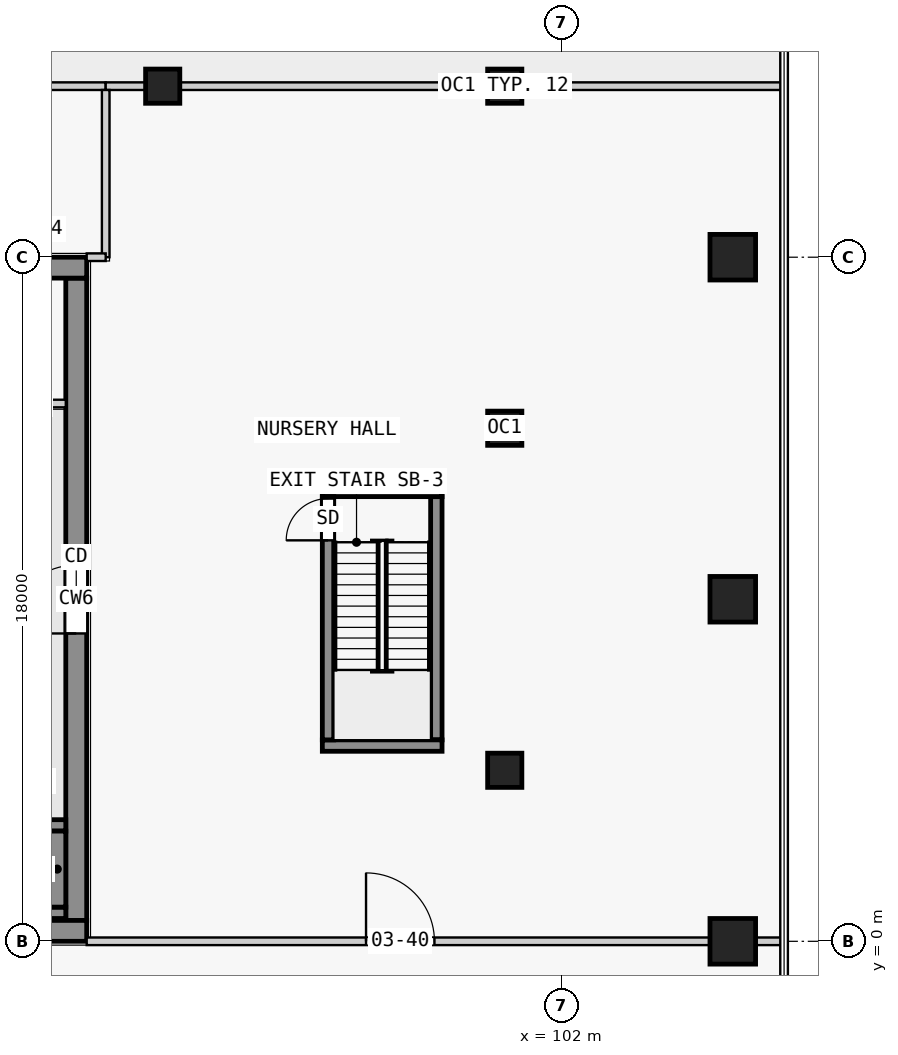
"""IFC4 building model, lengths in metres.
Left out: names, types, materials, properties, quantities, classifications, styles, units other than length and angle.
Written with IfcOpenShell. Run it as: python <this file> out.ifc"""

import sys

from ifc_helpers import new_model, si_unit, direction, frame, frame_2d, origin, origin_2d, place, context, subcontext, project, spatial, rectangle, extrude, element, fill, save


model = new_model("IFC4")
c1 = context("Model", 3, precision=1e-05, world=origin(), true_north=direction((0.0, 1.0)))
c2 = subcontext(c1, "Body", "Model", "MODEL_VIEW")
j1 = project(units=[si_unit("LENGTHUNIT", "METRE"), si_unit("PLANEANGLEUNIT", "RADIAN")], contexts=[c1])
p1 = place(None, origin())
s1 = spatial("IfcSite", under=j1, at=p1, CompositionType="ELEMENT")
p2 = place(p1, origin())
s2 = spatial("IfcBuilding", under=s1, at=p2, CompositionType="ELEMENT")
p3 = place(p2, frame((0.0, 0.0, 17.3)))
s3 = spatial("IfcBuildingStorey", under=s2, at=p3, CompositionType="ELEMENT", Elevation=17.3)
for number, where, z_axis, x_axis in (
    (1, (106.5, 0.0, 0.0), (0.0, 0.0, 1.0), (1.0, 0.0, 0.0)),
    (2, (106.5, 9.0, 0.0), (0.0, 0.0, 1.0), (1.0, 0.0, 0.0)),
    (3, (106.5, 18.0, 0.0), (0.0, 0.0, 1.0), (1.0, 0.0, 0.0)),
):
    element("IfcColumn", number, at=place(p3, frame(where, z_axis=z_axis, x_axis=x_axis)), inside=s3, PredefinedType="COLUMN", context=c2, shape_type="SweptSolid", body=[
        extrude(rectangle(XDim=1.2, YDim=1.2, at=origin_2d()), origin(), (0.0, 0.0, 1.0), 4.5),
    ])
for number, where, z_axis, x_axis in (
    (4, (100.5, 4.5, 0.0), (0.0, 0.0, 1.0), (1.0, 0.0, 0.0)),
    (5, (100.5, 13.5, 0.0), (0.0, 0.0, 1.0), (1.0, 0.0, 0.0)),
    (6, (100.5, 22.5, 0.0), (0.0, 0.0, 1.0), (1.0, 0.0, 0.0)),
    (7, (91.5, 22.5, 0.0), (0.0, 0.0, 1.0), (1.0, 0.0, 0.0)),
):
    element("IfcColumn", number, at=place(p3, frame(where, z_axis=z_axis, x_axis=x_axis)), inside=s3, PredefinedType="COLUMN", context=c2, shape_type="SweptSolid", body=[
        extrude(rectangle(XDim=0.9, YDim=0.9, at=origin_2d()), origin(), (0.0, 0.0, 1.0), 4.5),
    ])
for number, where, z_axis, x_axis in (
    (8, (75.0, 0.275, 0.0), (0.0, 0.0, 1.0), (1.0, 0.0, 0.0)),
    (9, (75.0, 17.725, 0.0), (0.0, 0.0, 1.0), (1.0, 0.0, 0.0)),
):
    element("IfcWall", number, at=place(p3, frame(where, z_axis=z_axis, x_axis=x_axis)), inside=s3, PredefinedType="SHEAR", context=c2, shape_type="SweptSolid", body=[
        extrude(rectangle(XDim=14.5, YDim=0.55, at=frame_2d((7.25, 0.0))), origin(), (0.0, 0.0, 1.0), 4.15),
    ])
p4 = place(p3, frame((89.225, 0.55, 0.0), z_axis=(0.0, 0.0, 1.0), x_axis=(0.0, 1.0, 0.0)))
e10 = element("IfcWall", 10, at=p4, inside=s3, PredefinedType="SHEAR", context=c2, shape_type="SweptSolid", body=[
    extrude(rectangle(XDim=16.9, YDim=0.55, at=frame_2d((8.45, 0.0))), origin(), (0.0, 0.0, 1.0), 4.15),
])
p5 = place(p4, frame((7.55, 0.0, 0.0)))
e11 = element("IfcOpeningElement", 11, at=p5, cuts=e10, PredefinedType="OPENING", context=c2, shape_type="SweptSolid", body=[
    extrude(rectangle(XDim=1.8, YDim=2.1, at=frame_2d((0.9, 1.05))), frame((0.0, 0.285, 0.0), z_axis=(0.0, -1.0, 0.0), x_axis=(1.0, 0.0, 0.0)), (0.0, 0.0, 1.0), 0.57),
])
p6 = place(p3, frame((81.3, 0.75, 0.0), z_axis=(0.0, 0.0, 1.0), x_axis=(1.0, 0.0, 0.0)))
e12 = element("IfcWall", 12, at=p6, inside=s3, PredefinedType="SHEAR", context=c2, shape_type="SweptSolid", body=[
    extrude(rectangle(XDim=7.65, YDim=0.3, at=frame_2d((3.825, 0.0))), origin(), (0.0, 0.0, 1.0), 4.15),
])
p7 = place(p3, frame((88.725, 0.9, 0.0), z_axis=(0.0, 0.0, 1.0), x_axis=(0.0, 1.0, 0.0)))
e13 = element("IfcWall", 13, at=p7, inside=s3, PredefinedType="SHEAR", context=c2, shape_type="SweptSolid", body=[
    extrude(rectangle(XDim=2.0, YDim=0.45, at=frame_2d((1.0, 0.0))), origin(), (0.0, 0.0, 1.0), 4.15),
])
p8 = place(p3, frame((81.3, 3.05, 0.0), z_axis=(0.0, 0.0, 1.0), x_axis=(1.0, 0.0, 0.0)))
e14 = element("IfcWall", 14, at=p8, inside=s3, PredefinedType="SHEAR", context=c2, shape_type="SweptSolid", body=[
    extrude(rectangle(XDim=7.65, YDim=0.3, at=frame_2d((3.825, 0.0))), origin(), (0.0, 0.0, 1.0), 4.15),
])
p9 = place(p8, frame((0.55, 0.0, 0.0)))
e15 = element("IfcOpeningElement", 15, at=p9, cuts=e14, PredefinedType="OPENING", context=c2, shape_type="SweptSolid", body=[
    extrude(rectangle(XDim=1.1, YDim=2.1, at=frame_2d((0.55, 1.05))), frame((0.0, 0.16, 0.0), z_axis=(0.0, -1.0, 0.0), x_axis=(1.0, 0.0, 0.0)), (0.0, 0.0, 1.0), 0.32),
])
p10 = place(p8, frame((3.05, 0.0, 0.0)))
e16 = element("IfcOpeningElement", 16, at=p10, cuts=e14, PredefinedType="OPENING", context=c2, shape_type="SweptSolid", body=[
    extrude(rectangle(XDim=1.1, YDim=2.1, at=frame_2d((0.55, 1.05))), frame((0.0, 0.16, 0.0), z_axis=(0.0, -1.0, 0.0), x_axis=(1.0, 0.0, 0.0)), (0.0, 0.0, 1.0), 0.32),
])
p11 = place(p8, frame((5.55, 0.0, 0.0)))
e17 = element("IfcOpeningElement", 17, at=p11, cuts=e14, PredefinedType="OPENING", context=c2, shape_type="SweptSolid", body=[
    extrude(rectangle(XDim=1.1, YDim=2.1, at=frame_2d((0.55, 1.05))), frame((0.0, 0.16, 0.0), z_axis=(0.0, -1.0, 0.0), x_axis=(1.0, 0.0, 0.0)), (0.0, 0.0, 1.0), 0.32),
])
p12 = place(p3, frame((95.85, 5.3, 0.0), z_axis=(0.0, 0.0, 1.0), x_axis=(0.0, 1.0, 0.0)))
e18 = element("IfcWall", 18, at=p12, inside=s3, PredefinedType="SHEAR", context=c2, shape_type="SweptSolid", body=[
    extrude(rectangle(XDim=6.4, YDim=0.3, at=frame_2d((3.2, 0.0))), origin(), (0.0, 0.0, 1.0), 4.15),
])
p13 = place(p12, frame((5.25, 0.0, 0.0)))
e19 = element("IfcOpeningElement", 19, at=p13, cuts=e18, PredefinedType="OPENING", context=c2, shape_type="SweptSolid", body=[
    extrude(rectangle(XDim=1.1, YDim=2.1, at=frame_2d((0.55, 1.05))), frame((0.0, 0.16, 0.0), z_axis=(0.0, -1.0, 0.0), x_axis=(1.0, 0.0, 0.0)), (0.0, 0.0, 1.0), 0.32),
])
p14 = place(p3, frame((98.7, 5.3, 0.0), z_axis=(0.0, 0.0, 1.0), x_axis=(0.0, 1.0, 0.0)))
e20 = element("IfcWall", 20, at=p14, inside=s3, PredefinedType="SHEAR", context=c2, shape_type="SweptSolid", body=[
    extrude(rectangle(XDim=6.4, YDim=0.3, at=frame_2d((3.2, 0.0))), origin(), (0.0, 0.0, 1.0), 4.15),
])
for number, where, z_axis, x_axis in (
    (21, (95.7, 5.15, 0.0), (0.0, 0.0, 1.0), (1.0, 0.0, 0.0)),
    (22, (95.7, 11.85, 0.0), (0.0, 0.0, 1.0), (1.0, 0.0, 0.0)),
):
    element("IfcWall", number, at=place(p3, frame(where, z_axis=z_axis, x_axis=x_axis)), inside=s3, PredefinedType="SHEAR", context=c2, shape_type="SweptSolid", body=[
        extrude(rectangle(XDim=3.15, YDim=0.3, at=frame_2d((1.575, 0.0))), origin(), (0.0, 0.0, 1.0), 4.15),
    ])
p15 = place(p3, frame((85.5, 14.15, 0.0), z_axis=(0.0, 0.0, 1.0), x_axis=(1.0, 0.0, 0.0)))
e23 = element("IfcWall", 23, at=p15, inside=s3, PredefinedType="PARTITIONING", context=c2, shape_type="SweptSolid", body=[
    extrude(rectangle(XDim=3.45, YDim=0.2, at=frame_2d((1.725, 0.0))), origin(), (0.0, 0.0, 1.0), 4.15),
])
p16 = place(p15, frame((0.55, 0.0, 0.0)))
e24 = element("IfcOpeningElement", 24, at=p16, cuts=e23, PredefinedType="OPENING", context=c2, shape_type="SweptSolid", body=[
    extrude(rectangle(XDim=0.9, YDim=2.1, at=frame_2d((0.45, 1.05))), frame((0.0, 0.11, 0.0), z_axis=(0.0, -1.0, 0.0), x_axis=(1.0, 0.0, 0.0)), (0.0, 0.0, 1.0), 0.22),
])
p17 = place(p15, frame((2.125, 0.0, 0.0)))
e25 = element("IfcOpeningElement", 25, at=p17, cuts=e23, PredefinedType="OPENING", context=c2, shape_type="SweptSolid", body=[
    extrude(rectangle(XDim=0.9, YDim=2.1, at=frame_2d((0.45, 1.05))), frame((0.0, 0.11, 0.0), z_axis=(0.0, -1.0, 0.0), x_axis=(1.0, 0.0, 0.0)), (0.0, 0.0, 1.0), 0.22),
])
p18 = place(p3, frame((89.5, 0.0, 0.0), z_axis=(0.0, 0.0, 1.0), x_axis=(1.0, 0.0, 0.0)))
e26 = element("IfcWall", 26, at=p18, inside=s3, PredefinedType="PARTITIONING", context=c2, shape_type="SweptSolid", body=[
    extrude(rectangle(XDim=16.4, YDim=0.2, at=frame_2d((8.2, 0.0))), origin(), (0.0, 0.0, 1.0), 4.15),
])
p19 = place(p18, frame((7.35, 0.0, 0.0)))
e27 = element("IfcOpeningElement", 27, at=p19, cuts=e26, PredefinedType="OPENING", context=c2, shape_type="SweptSolid", body=[
    extrude(rectangle(XDim=1.8, YDim=2.1, at=frame_2d((0.9, 1.05))), frame((0.0, 0.11, 0.0), z_axis=(0.0, -1.0, 0.0), x_axis=(1.0, 0.0, 0.0)), (0.0, 0.0, 1.0), 0.22),
])
p20 = place(p3, frame((107.1, 0.0, 0.0), z_axis=(0.0, 0.0, 1.0), x_axis=(1.0, 0.0, 0.0)))
e28 = element("IfcWall", 28, at=p20, inside=s3, PredefinedType="PARTITIONING", context=c2, shape_type="SweptSolid", body=[
    extrude(rectangle(XDim=0.75, YDim=0.2, at=frame_2d((0.375, 0.0))), origin(), (0.0, 0.0, 1.0), 4.15),
])
p21 = place(p3, frame((90.0, 22.5, 0.0), z_axis=(0.0, 0.0, 1.0), x_axis=(-1.0, 0.0, 0.0)))
e29 = element("IfcWall", 29, at=p21, inside=s3, PredefinedType="PARTITIONING", context=c2, shape_type="SweptSolid", body=[
    extrude(rectangle(XDim=7.05, YDim=0.2, at=frame_2d((3.525, 0.0))), origin(), (0.0, 0.0, 1.0), 4.15),
])
p22 = place(p21, frame((2.6, 0.0, 0.0)))
e30 = element("IfcOpeningElement", 30, at=p22, cuts=e29, PredefinedType="OPENING", context=c2, shape_type="SweptSolid", body=[
    extrude(rectangle(XDim=1.8, YDim=2.1, at=frame_2d((0.9, 1.05))), frame((0.0, 0.11, 0.0), z_axis=(0.0, -1.0, 0.0), x_axis=(1.0, 0.0, 0.0)), (0.0, 0.0, 1.0), 0.22),
])
p23 = place(p3, frame((107.85, 22.5, 0.0), z_axis=(0.0, 0.0, 1.0), x_axis=(-1.0, 0.0, 0.0)))
e31 = element("IfcWall", 31, at=p23, inside=s3, PredefinedType="PARTITIONING", context=c2, shape_type="SweptSolid", body=[
    extrude(rectangle(XDim=6.9, YDim=0.2, at=frame_2d((3.45, 0.0))), origin(), (0.0, 0.0, 1.0), 4.15),
])
p24 = place(p3, frame((100.05, 22.5, 0.0), z_axis=(0.0, 0.0, 1.0), x_axis=(-1.0, 0.0, 0.0)))
e32 = element("IfcWall", 32, at=p24, inside=s3, PredefinedType="PARTITIONING", context=c2, shape_type="SweptSolid", body=[
    extrude(rectangle(XDim=8.1, YDim=0.2, at=frame_2d((4.05, 0.0))), origin(), (0.0, 0.0, 1.0), 4.15),
])
p25 = place(p3, frame((91.05, 22.5, 0.0), z_axis=(0.0, 0.0, 1.0), x_axis=(-1.0, 0.0, 0.0)))
e33 = element("IfcWall", 33, at=p25, inside=s3, PredefinedType="PARTITIONING", context=c2, shape_type="SweptSolid", body=[
    extrude(rectangle(XDim=1.05, YDim=0.2, at=frame_2d((0.525, 0.0))), origin(), (0.0, 0.0, 1.0), 4.15),
])
p26 = place(p3, frame((90.0, 22.4, 0.0), z_axis=(0.0, 0.0, 1.0), x_axis=(0.0, -1.0, 0.0)))
e34 = element("IfcWall", 34, at=p26, inside=s3, PredefinedType="PARTITIONING", context=c2, shape_type="SweptSolid", body=[
    extrude(rectangle(XDim=4.4, YDim=0.2, at=frame_2d((2.2, 0.0))), origin(), (0.0, 0.0, 1.0), 4.15),
])
p27 = place(p3, frame((90.0, 18.0, 0.0), z_axis=(0.0, 0.0, 1.0), x_axis=(-1.0, 0.0, 0.0)))
e35 = element("IfcWall", 35, at=p27, inside=s3, PredefinedType="PARTITIONING", context=c2, shape_type="SweptSolid", body=[
    extrude(rectangle(XDim=0.5, YDim=0.2, at=frame_2d((0.25, 0.0))), origin(), (0.0, 0.0, 1.0), 4.15),
])
p28 = place(p13, origin())
e36 = element("IfcDoor", 36, at=p28, inside=s3, OperationType="SINGLE_SWING_LEFT", PredefinedType="DOOR", context=c2, shape_type="SweptSolid", body=[
    extrude(rectangle(XDim=1.1, YDim=2.1, at=frame_2d((0.55, 1.05))), frame((0.0, 0.025, 0.0), z_axis=(0.0, -1.0, 0.0), x_axis=(1.0, 0.0, 0.0)), (0.0, 0.0, 1.0), 0.05),
])
fill(e19, e36)
p29 = place(p5, origin())
e37 = element("IfcDoor", 37, at=p29, inside=s3, OperationType="DOUBLE_DOOR_SINGLE_SWING", PredefinedType="DOOR", context=c2, shape_type="SweptSolid", body=[
    extrude(rectangle(XDim=1.8, YDim=2.1, at=frame_2d((0.9, 1.05))), frame((0.0, 0.025, 0.0), z_axis=(0.0, -1.0, 0.0), x_axis=(1.0, 0.0, 0.0)), (0.0, 0.0, 1.0), 0.05),
])
fill(e11, e37)
p30 = place(p19, origin())
e38 = element("IfcDoor", 38, at=p30, inside=s3, OperationType="DOUBLE_DOOR_SINGLE_SWING", PredefinedType="DOOR", context=c2, shape_type="SweptSolid", body=[
    extrude(rectangle(XDim=1.8, YDim=2.1, at=frame_2d((0.9, 1.05))), frame((0.0, 0.025, 0.0), z_axis=(0.0, -1.0, 0.0), x_axis=(1.0, 0.0, 0.0)), (0.0, 0.0, 1.0), 0.05),
])
fill(e27, e38)
save(model, sys.argv[1])
